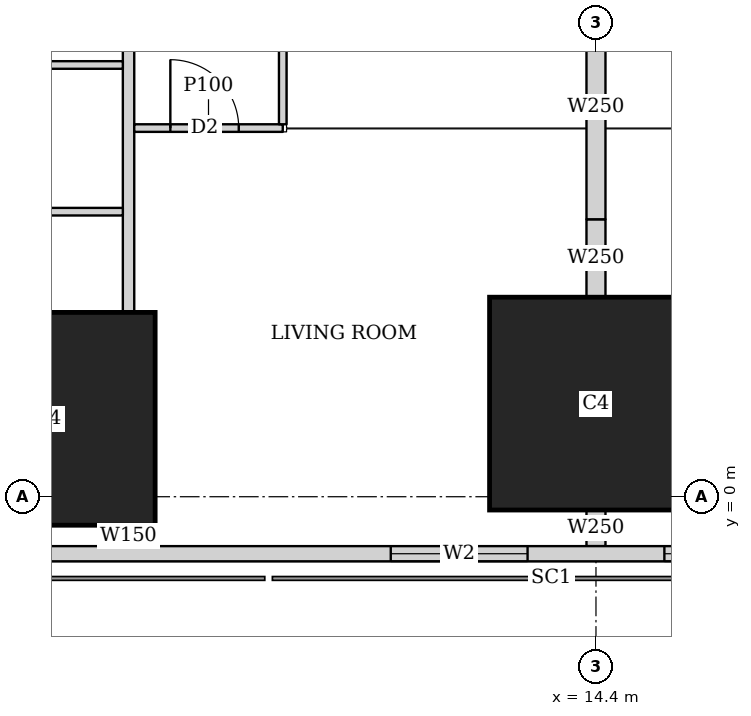
"""IFC4 building model, lengths in metres.
Left out: names, types, materials, properties, quantities, classifications, styles, units other than length and angle.
Written with IfcOpenShell. Run it as: python <this file> out.ifc"""

import sys

from ifc_helpers import new_model, si_unit, direction, frame, frame_2d, origin, origin_2d, place, context, subcontext, project, spatial, rectangle, extrude, element, fill, save


model = new_model("IFC4")
c1 = context("Model", 3, precision=1e-05, world=origin(), true_north=direction((0.0, 1.0)))
c2 = subcontext(c1, "Body", "Model", "MODEL_VIEW")
j1 = project(units=[si_unit("LENGTHUNIT", "METRE"), si_unit("PLANEANGLEUNIT", "RADIAN")], contexts=[c1])
p1 = place(None, origin())
s1 = spatial("IfcSite", under=j1, at=p1, CompositionType="ELEMENT")
p2 = place(p1, origin())
s2 = spatial("IfcBuilding", under=s1, at=p2, CompositionType="ELEMENT")
p3 = place(p2, frame((0.0, 0.0, 31.25)))
s3 = spatial("IfcBuildingStorey", under=s2, at=p3, CompositionType="ELEMENT", Elevation=31.25)
for number, where, z_axis, x_axis in (
    (1, (7.2, 1.025, 0.0), (0.0, 0.0, 1.0), (1.0, 0.0, 0.0)),
    (2, (14.4, 1.225, 0.0), (0.0, 0.0, 1.0), (1.0, 0.0, 0.0)),
):
    element("IfcColumn", number, at=place(p3, frame(where, z_axis=z_axis, x_axis=x_axis)), inside=s3, PredefinedType="COLUMN", context=c2, shape_type="SweptSolid", body=[
        extrude(rectangle(XDim=2.8, YDim=2.8, at=origin_2d()), origin(), (0.0, 0.0, 1.0), 3.75),
    ])
p4 = place(p3, frame((2.163, -0.75, 0.0), z_axis=(0.0, 0.0, 1.0), x_axis=(1.0, 0.0, 0.0)))
e3 = element("IfcWall", 3, at=p4, inside=s3, PredefinedType="SOLIDWALL", context=c2, shape_type="SweptSolid", body=[
    extrude(rectangle(XDim=45.628, YDim=0.2, at=frame_2d((22.814, 0.0))), origin(), (0.0, 0.0, 1.0), 3.5),
])
p5 = place(p4, frame((9.537, 0.0, 0.9)))
e4 = element("IfcOpeningElement", 4, at=p5, cuts=e3, PredefinedType="OPENING", context=c2, shape_type="SweptSolid", body=[
    extrude(rectangle(XDim=1.8, YDim=1.5, at=frame_2d((0.9, 0.75))), frame((0.0, 0.11, 0.0), z_axis=(0.0, -1.0, 0.0), x_axis=(1.0, 0.0, 0.0)), (0.0, 0.0, 1.0), 0.22),
])
p6 = place(p4, frame((13.137, 0.0, 0.9)))
e5 = element("IfcOpeningElement", 5, at=p6, cuts=e3, PredefinedType="OPENING", context=c2, shape_type="SweptSolid", body=[
    extrude(rectangle(XDim=1.8, YDim=1.5, at=frame_2d((0.9, 0.75))), frame((0.0, 0.11, 0.0), z_axis=(0.0, -1.0, 0.0), x_axis=(1.0, 0.0, 0.0)), (0.0, 0.0, 1.0), 0.22),
])
p7 = place(p4, frame((16.737, 0.0, 0.9)))
e6 = element("IfcOpeningElement", 6, at=p7, cuts=e3, PredefinedType="OPENING", context=c2, shape_type="SweptSolid", body=[
    extrude(rectangle(XDim=1.8, YDim=1.5, at=frame_2d((0.9, 0.75))), frame((0.0, 0.11, 0.0), z_axis=(0.0, -1.0, 0.0), x_axis=(1.0, 0.0, 0.0)), (0.0, 0.0, 1.0), 0.22),
])
p8 = place(p4, frame((20.337, 0.0, 0.9)))
e7 = element("IfcOpeningElement", 7, at=p8, cuts=e3, PredefinedType="OPENING", context=c2, shape_type="SweptSolid", body=[
    extrude(rectangle(XDim=1.8, YDim=1.5, at=frame_2d((0.9, 0.75))), frame((0.0, 0.11, 0.0), z_axis=(0.0, -1.0, 0.0), x_axis=(1.0, 0.0, 0.0)), (0.0, 0.0, 1.0), 0.22),
])
p9 = place(p4, frame((23.937, 0.0, 0.9)))
e8 = element("IfcOpeningElement", 8, at=p9, cuts=e3, PredefinedType="OPENING", context=c2, shape_type="SweptSolid", body=[
    extrude(rectangle(XDim=1.8, YDim=1.5, at=frame_2d((0.9, 0.75))), frame((0.0, 0.11, 0.0), z_axis=(0.0, -1.0, 0.0), x_axis=(1.0, 0.0, 0.0)), (0.0, 0.0, 1.0), 0.22),
])
p10 = place(p4, frame((27.537, 0.0, 0.9)))
e9 = element("IfcOpeningElement", 9, at=p10, cuts=e3, PredefinedType="OPENING", context=c2, shape_type="SweptSolid", body=[
    extrude(rectangle(XDim=1.8, YDim=1.5, at=frame_2d((0.9, 0.75))), frame((0.0, 0.11, 0.0), z_axis=(0.0, -1.0, 0.0), x_axis=(1.0, 0.0, 0.0)), (0.0, 0.0, 1.0), 0.22),
])
p11 = place(p4, frame((31.137, 0.0, 0.9)))
e10 = element("IfcOpeningElement", 10, at=p11, cuts=e3, PredefinedType="OPENING", context=c2, shape_type="SweptSolid", body=[
    extrude(rectangle(XDim=1.8, YDim=1.5, at=frame_2d((0.9, 0.75))), frame((0.0, 0.11, 0.0), z_axis=(0.0, -1.0, 0.0), x_axis=(1.0, 0.0, 0.0)), (0.0, 0.0, 1.0), 0.22),
])
p12 = place(p4, frame((34.737, 0.0, 0.9)))
e11 = element("IfcOpeningElement", 11, at=p12, cuts=e3, PredefinedType="OPENING", context=c2, shape_type="SweptSolid", body=[
    extrude(rectangle(XDim=1.8, YDim=1.5, at=frame_2d((0.9, 0.75))), frame((0.0, 0.11, 0.0), z_axis=(0.0, -1.0, 0.0), x_axis=(1.0, 0.0, 0.0)), (0.0, 0.0, 1.0), 0.22),
])
p13 = place(p3, frame((8.25, -0.65, 0.0), z_axis=(0.0, 0.0, 1.0), x_axis=(0.0, 1.0, 0.0)))
e12 = element("IfcWall", 12, at=p13, inside=s3, PredefinedType="SOLIDWALL", context=c2, shape_type="SweptSolid", body=[
    extrude(rectangle(XDim=0.274, YDim=0.15, at=frame_2d((0.137, 0.0))), origin(), (0.0, 0.0, 1.0), 3.5),
])
p14 = place(p3, frame((8.25, 2.426, 0.0), z_axis=(0.0, 0.0, 1.0), x_axis=(0.0, 1.0, 0.0)))
e13 = element("IfcWall", 13, at=p14, inside=s3, PredefinedType="SOLIDWALL", context=c2, shape_type="SweptSolid", body=[
    extrude(rectangle(XDim=40.173, YDim=0.15, at=frame_2d((20.086, 0.0))), origin(), (0.0, 0.0, 1.0), 3.5),
])
p15 = place(p14, frame((14.161, 0.0, 0.0)))
e14 = element("IfcOpeningElement", 14, at=p15, cuts=e13, PredefinedType="OPENING", context=c2, shape_type="SweptSolid", body=[
    extrude(rectangle(XDim=1.0, YDim=2.1, at=frame_2d((0.5, 1.05))), frame((0.0, 0.085, 0.0), z_axis=(0.0, -1.0, 0.0), x_axis=(1.0, 0.0, 0.0)), (0.0, 0.0, 1.0), 0.17),
])
p16 = place(p14, frame((17.487, 0.0, 0.0)))
e15 = element("IfcOpeningElement", 15, at=p16, cuts=e13, PredefinedType="OPENING", context=c2, shape_type="SweptSolid", body=[
    extrude(rectangle(XDim=1.0, YDim=2.1, at=frame_2d((0.5, 1.05))), frame((0.0, 0.085, 0.0), z_axis=(0.0, -1.0, 0.0), x_axis=(1.0, 0.0, 0.0)), (0.0, 0.0, 1.0), 0.17),
])
p17 = place(p14, frame((29.161, 0.0, 0.0)))
e16 = element("IfcOpeningElement", 16, at=p17, cuts=e13, PredefinedType="OPENING", context=c2, shape_type="SweptSolid", body=[
    extrude(rectangle(XDim=1.0, YDim=2.1, at=frame_2d((0.5, 1.05))), frame((0.0, 0.085, 0.0), z_axis=(0.0, -1.0, 0.0), x_axis=(1.0, 0.0, 0.0)), (0.0, 0.0, 1.0), 0.17),
])
for number, where, z_axis, x_axis in (
    (17, (4.9, 3.75, 0.0), (0.0, 0.0, 1.0), (1.0, 0.0, 0.0)),
    (18, (4.9, 5.68, 0.0), (0.0, 0.0, 1.0), (1.0, 0.0, 0.0)),
):
    element("IfcWall", number, at=place(p3, frame(where, z_axis=z_axis, x_axis=x_axis)), inside=s3, PredefinedType="PARTITIONING", context=c2, shape_type="SweptSolid", body=[
        extrude(rectangle(XDim=3.275, YDim=0.1, at=frame_2d((1.638, 0.0))), origin(), (0.0, 0.0, 1.0), 3.5),
    ])
p18 = place(p3, frame((10.279, 4.85, 0.0), z_axis=(0.0, 0.0, 1.0), x_axis=(-1.0, 0.0, 0.0)))
e19 = element("IfcWall", 19, at=p18, inside=s3, PredefinedType="PARTITIONING", context=c2, shape_type="SweptSolid", body=[
    extrude(rectangle(XDim=1.954, YDim=0.1, at=frame_2d((0.977, 0.0))), origin(), (0.0, 0.0, 1.0), 3.5),
])
p19 = place(p18, frame((0.579, 0.0, 0.0)))
e20 = element("IfcOpeningElement", 20, at=p19, cuts=e19, PredefinedType="OPENING", context=c2, shape_type="SweptSolid", body=[
    extrude(rectangle(XDim=0.9, YDim=2.1, at=frame_2d((0.45, 1.05))), frame((0.0, 0.06, 0.0), z_axis=(0.0, -1.0, 0.0), x_axis=(1.0, 0.0, 0.0)), (0.0, 0.0, 1.0), 0.12),
])
p20 = place(p3, frame((10.279, 4.9, 0.0), z_axis=(0.0, 0.0, 1.0), x_axis=(0.0, 1.0, 0.0)))
e21 = element("IfcWall", 21, at=p20, inside=s3, PredefinedType="PARTITIONING", context=c2, shape_type="SweptSolid", body=[
    extrude(rectangle(XDim=3.275, YDim=0.1, at=frame_2d((1.638, 0.0))), origin(), (0.0, 0.0, 1.0), 3.5),
])
p21 = place(p3, frame((14.4, -0.65, 0.0), z_axis=(0.0, 0.0, 1.0), x_axis=(0.0, 1.0, 0.0)))
e22 = element("IfcWall", 22, at=p21, inside=s3, PredefinedType="SOLIDWALL", context=c2, shape_type="SweptSolid", body=[
    extrude(rectangle(XDim=0.474, YDim=0.25, at=frame_2d((0.237, 0.0))), origin(), (0.0, 0.0, 1.0), 3.5),
])
p22 = place(p3, frame((14.4, 2.626, 0.0), z_axis=(0.0, 0.0, 1.0), x_axis=(0.0, 1.0, 0.0)))
e23 = element("IfcWall", 23, at=p22, inside=s3, PredefinedType="SOLIDWALL", context=c2, shape_type="SweptSolid", body=[
    extrude(rectangle(XDim=1.024, YDim=0.25, at=frame_2d((0.512, 0.0))), origin(), (0.0, 0.0, 1.0), 3.5),
])
p23 = place(p3, frame((14.4, 3.65, 0.0), z_axis=(0.0, 0.0, 1.0), x_axis=(0.0, 1.0, 0.0)))
e24 = element("IfcWall", 24, at=p23, inside=s3, PredefinedType="SOLIDWALL", context=c2, shape_type="SweptSolid", body=[
    extrude(rectangle(XDim=2.949, YDim=0.25, at=frame_2d((1.475, 0.0))), origin(), (0.0, 0.0, 1.0), 3.5),
])
p24 = place(p5, origin())
e25 = element("IfcWindow", 25, at=p24, inside=s3, PartitioningType="SINGLE_PANEL", PredefinedType="WINDOW", context=c2, shape_type="SweptSolid", body=[
    extrude(rectangle(XDim=1.8, YDim=1.5, at=frame_2d((0.9, 0.75))), frame((0.0, 0.03, 0.0), z_axis=(0.0, -1.0, 0.0), x_axis=(1.0, 0.0, 0.0)), (0.0, 0.0, 1.0), 0.06),
])
fill(e4, e25)
p25 = place(p6, origin())
e26 = element("IfcWindow", 26, at=p25, inside=s3, PartitioningType="SINGLE_PANEL", PredefinedType="WINDOW", context=c2, shape_type="SweptSolid", body=[
    extrude(rectangle(XDim=1.8, YDim=1.5, at=frame_2d((0.9, 0.75))), frame((0.0, 0.03, 0.0), z_axis=(0.0, -1.0, 0.0), x_axis=(1.0, 0.0, 0.0)), (0.0, 0.0, 1.0), 0.06),
])
fill(e5, e26)
p26 = place(p19, origin())
e27 = element("IfcDoor", 27, at=p26, inside=s3, OperationType="SINGLE_SWING_LEFT", PredefinedType="DOOR", context=c2, shape_type="SweptSolid", body=[
    extrude(rectangle(XDim=0.9, YDim=2.1, at=frame_2d((0.45, 1.05))), frame((0.0, 0.025, 0.0), z_axis=(0.0, -1.0, 0.0), x_axis=(1.0, 0.0, 0.0)), (0.0, 0.0, 1.0), 0.05),
])
fill(e20, e27)
save(model, sys.argv[1])
